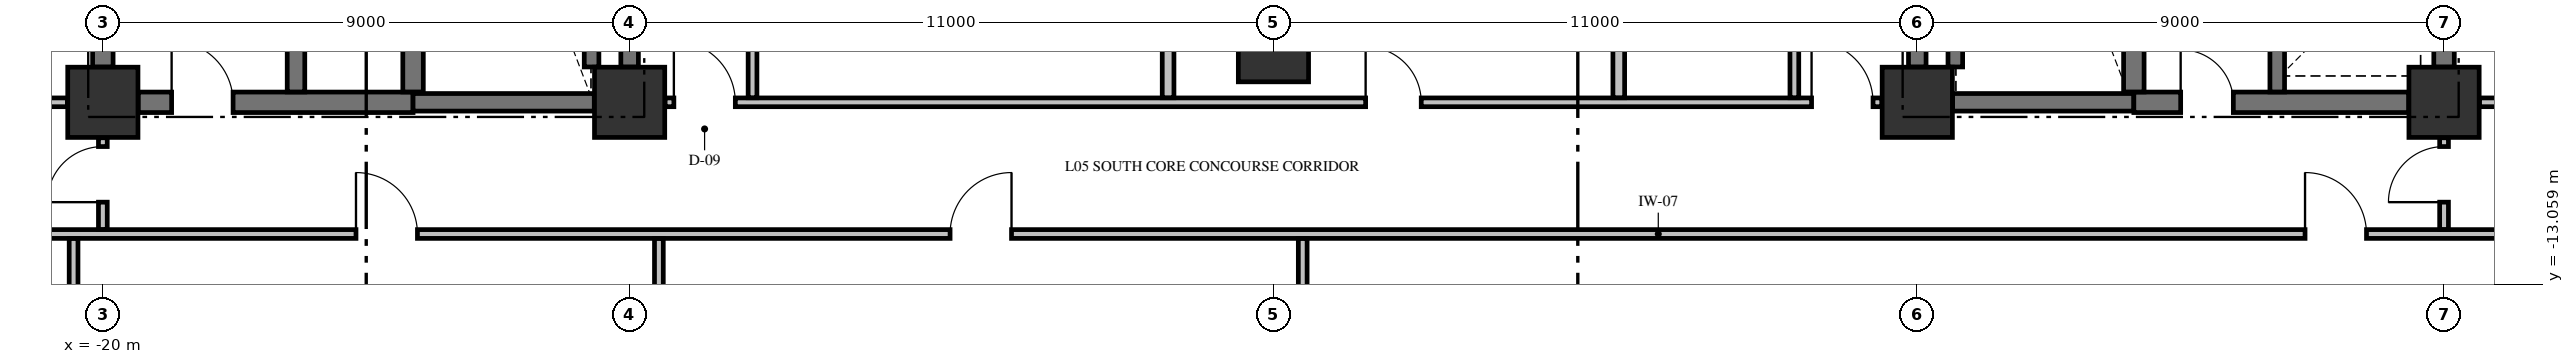
"""IFC4 building model, lengths in metres.
Left out: names, types, materials, properties, quantities, classifications, styles, units other than length and angle.
Written with IfcOpenShell. Run it as: python <this file> out.ifc"""

import sys

from ifc_helpers import new_model, si_unit, direction, frame, frame_2d, origin, origin_2d, place, context, subcontext, project, spatial, rectangle, extrude, element, fill, save


model = new_model("IFC4")
c1 = context("Model", 3, precision=1e-05, world=origin(), true_north=direction((0.0, 1.0)))
c2 = subcontext(c1, "Body", "Model", "MODEL_VIEW")
j1 = project(units=[si_unit("LENGTHUNIT", "METRE"), si_unit("PLANEANGLEUNIT", "RADIAN")], contexts=[c1])
p1 = place(None, origin())
s1 = spatial("IfcSite", under=j1, at=p1, CompositionType="ELEMENT")
p2 = place(p1, origin())
s2 = spatial("IfcBuilding", under=s1, at=p2, CompositionType="ELEMENT")
p3 = place(p2, frame((0.0, 0.0, 27.2)))
s3 = spatial("IfcBuildingStorey", under=s2, at=p3, CompositionType="ELEMENT", Elevation=27.2)
for number, where, z_axis, x_axis in (
    (1, (-20.0, -9.95, -0.45), (0.0, 0.0, 1.0), (1.0, 0.0, 0.0)),
    (2, (-11.0, -9.95, -0.45), (0.0, 0.0, 1.0), (1.0, 0.0, 0.0)),
    (3, (11.0, -9.95, -0.45), (0.0, 0.0, 1.0), (1.0, 0.0, 0.0)),
    (4, (20.0, -9.95, -0.45), (0.0, 0.0, 1.0), (1.0, 0.0, 0.0)),
    (5, (0.0, -9.0, -0.45), (0.0, 0.0, 1.0), (1.0, 0.0, 0.0)),
):
    element("IfcColumn", number, at=place(p3, frame(where, z_axis=z_axis, x_axis=x_axis)), inside=s3, PredefinedType="COLUMN", context=c2, shape_type="SweptSolid", body=[
        extrude(rectangle(XDim=1.2, YDim=1.2, at=origin_2d()), origin(), (0.0, 0.0, 1.0), 3.77),
    ])
p4 = place(p3, frame((-19.396, -9.95, 0.0), z_axis=(0.0, 0.0, 1.0), x_axis=(1.0, 0.0, 0.0)))
e6 = element("IfcWall", 6, at=p4, inside=s3, PredefinedType="SHEAR", context=c2, shape_type="SweptSolid", body=[
    extrude(rectangle(XDim=4.696, YDim=0.35, at=frame_2d((2.348, 0.0))), origin(), (0.0, 0.0, 1.0), 3.32),
])
p5 = place(p4, frame((0.571, 0.0, 0.0)))
e7 = element("IfcOpeningElement", 7, at=p5, cuts=e6, PredefinedType="OPENING", context=c2, shape_type="SweptSolid", body=[
    extrude(rectangle(XDim=1.05, YDim=2.15, at=frame_2d((0.525, 1.075))), frame((0.0, 0.185, 0.0), z_axis=(0.0, -1.0, 0.0), x_axis=(1.0, 0.0, 0.0)), (0.0, 0.0, 1.0), 0.37),
])
for number, where, z_axis, x_axis in (
    (8, (-14.7, -9.95, 0.0), (0.0, 0.0, 1.0), (1.0, 0.0, 0.0)),
    (9, (11.604, -9.95, 0.0), (0.0, 0.0, 1.0), (1.0, 0.0, 0.0)),
):
    element("IfcWall", number, at=place(p3, frame(where, z_axis=z_axis, x_axis=x_axis)), inside=s3, PredefinedType="SHEAR", context=c2, shape_type="SweptSolid", body=[
        extrude(rectangle(XDim=3.096, YDim=0.3, at=frame_2d((1.548, 0.0))), origin(), (0.0, 0.0, 1.0), 3.32),
    ])
p6 = place(p3, frame((14.7, -9.95, 0.0), z_axis=(0.0, 0.0, 1.0), x_axis=(1.0, 0.0, 0.0)))
e10 = element("IfcWall", 10, at=p6, inside=s3, PredefinedType="SHEAR", context=c2, shape_type="SweptSolid", body=[
    extrude(rectangle(XDim=4.696, YDim=0.35, at=frame_2d((2.348, 0.0))), origin(), (0.0, 0.0, 1.0), 3.32),
])
p7 = place(p6, frame((0.8, 0.0, 0.0)))
e11 = element("IfcOpeningElement", 11, at=p7, cuts=e10, PredefinedType="OPENING", context=c2, shape_type="SweptSolid", body=[
    extrude(rectangle(XDim=0.9, YDim=2.15, at=frame_2d((0.45, 1.075))), frame((0.0, 0.185, 0.0), z_axis=(0.0, -1.0, 0.0), x_axis=(1.0, 0.0, 0.0)), (0.0, 0.0, 1.0), 0.37),
])
p8 = place(p3, frame((-23.835, -12.2, 0.0), z_axis=(0.0, 0.0, 1.0), x_axis=(1.0, 0.0, 0.0)))
e12 = element("IfcWall", 12, at=p8, inside=s3, PredefinedType="PARTITIONING", context=c2, shape_type="SweptSolid", body=[
    extrude(rectangle(XDim=52.67, YDim=0.15, at=frame_2d((26.335, 0.0))), origin(), (0.0, 0.0, 1.0), 3.32),
])
p9 = place(p8, frame((8.16, 0.0, 0.0)))
e13 = element("IfcOpeningElement", 13, at=p9, cuts=e12, PredefinedType="OPENING", context=c2, shape_type="SweptSolid", body=[
    extrude(rectangle(XDim=1.05, YDim=2.15, at=frame_2d((0.525, 1.075))), frame((0.0, 0.085, 0.0), z_axis=(0.0, -1.0, 0.0), x_axis=(1.0, 0.0, 0.0)), (0.0, 0.0, 1.0), 0.17),
])
p10 = place(p8, frame((18.31, 0.0, 0.0)))
e14 = element("IfcOpeningElement", 14, at=p10, cuts=e12, PredefinedType="OPENING", context=c2, shape_type="SweptSolid", body=[
    extrude(rectangle(XDim=1.05, YDim=2.15, at=frame_2d((0.525, 1.075))), frame((0.0, 0.085, 0.0), z_axis=(0.0, -1.0, 0.0), x_axis=(1.0, 0.0, 0.0)), (0.0, 0.0, 1.0), 0.17),
])
p11 = place(p8, frame((41.46, 0.0, 0.0)))
e15 = element("IfcOpeningElement", 15, at=p11, cuts=e12, PredefinedType="OPENING", context=c2, shape_type="SweptSolid", body=[
    extrude(rectangle(XDim=1.05, YDim=2.15, at=frame_2d((0.525, 1.075))), frame((0.0, 0.085, 0.0), z_axis=(0.0, -1.0, 0.0), x_axis=(1.0, 0.0, 0.0)), (0.0, 0.0, 1.0), 0.17),
])
p12 = place(p3, frame((-23.835, -9.95, 0.0), z_axis=(0.0, 0.0, 1.0), x_axis=(1.0, 0.0, 0.0)))
e16 = element("IfcWall", 16, at=p12, inside=s3, PredefinedType="PARTITIONING", context=c2, shape_type="SweptSolid", body=[
    extrude(rectangle(XDim=3.229, YDim=0.15, at=frame_2d((1.615, 0.0))), origin(), (0.0, 0.0, 1.0), 3.32),
])
p13 = place(p12, frame((1.36, 0.0, 0.0)))
e17 = element("IfcOpeningElement", 17, at=p13, cuts=e16, PredefinedType="OPENING", context=c2, shape_type="SweptSolid", body=[
    extrude(rectangle(XDim=0.95, YDim=2.15, at=frame_2d((0.475, 1.075))), frame((0.0, 0.085, 0.0), z_axis=(0.0, -1.0, 0.0), x_axis=(1.0, 0.0, 0.0)), (0.0, 0.0, 1.0), 0.17),
])
p14 = place(p3, frame((-10.394, -9.95, 0.0), z_axis=(0.0, 0.0, 1.0), x_axis=(1.0, 0.0, 0.0)))
e18 = element("IfcWall", 18, at=p14, inside=s3, PredefinedType="PARTITIONING", context=c2, shape_type="SweptSolid", body=[
    extrude(rectangle(XDim=20.788, YDim=0.15, at=frame_2d((10.394, 0.0))), origin(), (0.0, 0.0, 1.0), 3.32),
])
p15 = place(p14, frame((0.15, 0.0, 0.0)))
e19 = element("IfcOpeningElement", 19, at=p15, cuts=e18, PredefinedType="OPENING", context=c2, shape_type="SweptSolid", body=[
    extrude(rectangle(XDim=1.05, YDim=2.15, at=frame_2d((0.525, 1.075))), frame((0.0, 0.085, 0.0), z_axis=(0.0, -1.0, 0.0), x_axis=(1.0, 0.0, 0.0)), (0.0, 0.0, 1.0), 0.17),
])
p16 = place(p14, frame((19.588, 0.0, 0.0)))
e20 = element("IfcOpeningElement", 20, at=p16, cuts=e18, PredefinedType="OPENING", context=c2, shape_type="SweptSolid", body=[
    extrude(rectangle(XDim=1.05, YDim=2.15, at=frame_2d((0.525, 1.075))), frame((0.0, 0.085, 0.0), z_axis=(0.0, -1.0, 0.0), x_axis=(1.0, 0.0, 0.0)), (0.0, 0.0, 1.0), 0.17),
])
p17 = place(p14, frame((11.969, 0.0, 0.0)))
e21 = element("IfcOpeningElement", 21, at=p17, cuts=e18, PredefinedType="OPENING", context=c2, shape_type="SweptSolid", body=[
    extrude(rectangle(XDim=0.95, YDim=2.15, at=frame_2d((0.475, 1.075))), frame((0.0, 0.085, 0.0), z_axis=(0.0, -1.0, 0.0), x_axis=(1.0, 0.0, 0.0)), (0.0, 0.0, 1.0), 0.17),
])
p18 = place(p3, frame((20.606, -9.95, 0.0), z_axis=(0.0, 0.0, 1.0), x_axis=(1.0, 0.0, 0.0)))
e22 = element("IfcWall", 22, at=p18, inside=s3, PredefinedType="PARTITIONING", context=c2, shape_type="SweptSolid", body=[
    extrude(rectangle(XDim=8.229, YDim=0.15, at=frame_2d((4.115, 0.0))), origin(), (0.0, 0.0, 1.0), 3.32),
])
p19 = place(p18, frame((3.394, 0.0, 0.0)))
e23 = element("IfcOpeningElement", 23, at=p19, cuts=e22, PredefinedType="OPENING", context=c2, shape_type="SweptSolid", body=[
    extrude(rectangle(XDim=1.0, YDim=2.15, at=frame_2d((0.5, 1.075))), frame((0.0, 0.085, 0.0), z_axis=(0.0, -1.0, 0.0), x_axis=(1.0, 0.0, 0.0)), (0.0, 0.0, 1.0), 0.17),
])
p20 = place(p3, frame((-20.0, -9.346, 0.0), z_axis=(0.0, 0.0, 1.0), x_axis=(0.0, 1.0, 0.0)))
e24 = element("IfcWall", 24, at=p20, inside=s3, PredefinedType="SHEAR", context=c2, shape_type="SweptSolid", body=[
    extrude(rectangle(XDim=8.742, YDim=0.35, at=frame_2d((4.371, 0.0))), origin(), (0.0, 0.0, 1.0), 3.32),
])
p21 = place(p3, frame((-16.7, -9.773, 0.0), z_axis=(0.0, 0.0, 1.0), x_axis=(0.0, 1.0, 0.0)))
e25 = element("IfcWall", 25, at=p21, inside=s3, PredefinedType="SHEAR", context=c2, shape_type="SweptSolid", body=[
    extrude(rectangle(XDim=9.371, YDim=0.3, at=frame_2d((4.686, 0.0))), origin(), (0.0, 0.0, 1.0), 3.32),
])
p22 = place(p3, frame((-14.7, -9.773, 0.0), z_axis=(0.0, 0.0, 1.0), x_axis=(0.0, 1.0, 0.0)))
e26 = element("IfcWall", 26, at=p22, inside=s3, PredefinedType="SHEAR", context=c2, shape_type="SweptSolid", body=[
    extrude(rectangle(XDim=9.371, YDim=0.35, at=frame_2d((4.686, 0.0))), origin(), (0.0, 0.0, 1.0), 3.32),
])
p23 = place(p3, frame((-11.65, -9.346, 0.0), z_axis=(0.0, 0.0, 1.0), x_axis=(0.0, 1.0, 0.0)))
e27 = element("IfcWall", 27, at=p23, inside=s3, PredefinedType="SOLIDWALL", context=c2, shape_type="SweptSolid", body=[
    extrude(rectangle(XDim=8.742, YDim=0.25, at=frame_2d((4.371, 0.0))), origin(), (0.0, 0.0, 1.0), 3.32),
])
for number, where, z_axis, x_axis in (
    (28, (-11.0, -9.346, 0.0), (0.0, 0.0, 1.0), (0.0, 1.0, 0.0)),
    (29, (11.0, -9.346, 0.0), (0.0, 0.0, 1.0), (0.0, 1.0, 0.0)),
):
    element("IfcWall", number, at=place(p3, frame(where, z_axis=z_axis, x_axis=x_axis)), inside=s3, PredefinedType="SHEAR", context=c2, shape_type="SweptSolid", body=[
        extrude(rectangle(XDim=8.742, YDim=0.3, at=frame_2d((4.371, 0.0))), origin(), (0.0, 0.0, 1.0), 3.32),
    ])
p24 = place(p3, frame((11.65, -9.346, 0.0), z_axis=(0.0, 0.0, 1.0), x_axis=(0.0, 1.0, 0.0)))
e30 = element("IfcWall", 30, at=p24, inside=s3, PredefinedType="SOLIDWALL", context=c2, shape_type="SweptSolid", body=[
    extrude(rectangle(XDim=8.742, YDim=0.25, at=frame_2d((4.371, 0.0))), origin(), (0.0, 0.0, 1.0), 3.32),
])
p25 = place(p3, frame((14.7, -9.773, 0.0), z_axis=(0.0, 0.0, 1.0), x_axis=(0.0, 1.0, 0.0)))
e31 = element("IfcWall", 31, at=p25, inside=s3, PredefinedType="SHEAR", context=c2, shape_type="SweptSolid", body=[
    extrude(rectangle(XDim=9.371, YDim=0.35, at=frame_2d((4.686, 0.0))), origin(), (0.0, 0.0, 1.0), 3.32),
])
p26 = place(p3, frame((17.15, -9.773, 0.0), z_axis=(0.0, 0.0, 1.0), x_axis=(0.0, 1.0, 0.0)))
e32 = element("IfcWall", 32, at=p26, inside=s3, PredefinedType="SOLIDWALL", context=c2, shape_type="SweptSolid", body=[
    extrude(rectangle(XDim=2.596, YDim=0.25, at=frame_2d((1.298, 0.0))), origin(), (0.0, 0.0, 1.0), 3.32),
])
p27 = place(p3, frame((20.0, -9.346, 0.0), z_axis=(0.0, 0.0, 1.0), x_axis=(0.0, 1.0, 0.0)))
e33 = element("IfcWall", 33, at=p27, inside=s3, PredefinedType="SHEAR", context=c2, shape_type="SweptSolid", body=[
    extrude(rectangle(XDim=2.169, YDim=0.35, at=frame_2d((1.084, 0.0))), origin(), (0.0, 0.0, 1.0), 3.32),
])
p28 = place(p3, frame((-20.5, -22.294, 0.0), z_axis=(0.0, 0.0, 1.0), x_axis=(0.0, 1.0, 0.0)))
e34 = element("IfcWall", 34, at=p28, inside=s3, PredefinedType="PARTITIONING", context=c2, shape_type="SweptSolid", body=[
    extrude(rectangle(XDim=10.016, YDim=0.15, at=frame_2d((5.008, 0.0))), origin(), (0.0, 0.0, 1.0), 3.32),
])
p29 = place(p3, frame((-20.0, -12.122, 0.0), z_axis=(0.0, 0.0, 1.0), x_axis=(0.0, 1.0, 0.0)))
e35 = element("IfcWall", 35, at=p29, inside=s3, PredefinedType="PARTITIONING", context=c2, shape_type="SweptSolid", body=[
    extrude(rectangle(XDim=1.566, YDim=0.15, at=frame_2d((0.783, 0.0))), origin(), (0.0, 0.0, 1.0), 3.32),
])
p30 = place(p29, frame((0.466, 0.0, 0.0)))
e36 = element("IfcOpeningElement", 36, at=p30, cuts=e35, PredefinedType="OPENING", context=c2, shape_type="SweptSolid", body=[
    extrude(rectangle(XDim=0.95, YDim=2.15, at=frame_2d((0.475, 1.075))), frame((0.0, 0.085, 0.0), z_axis=(0.0, -1.0, 0.0), x_axis=(1.0, 0.0, 0.0)), (0.0, 0.0, 1.0), 0.17),
])
p31 = place(p3, frame((-10.5, -25.794, 0.0), z_axis=(0.0, 0.0, 1.0), x_axis=(0.0, 1.0, 0.0)))
e37 = element("IfcWall", 37, at=p31, inside=s3, PredefinedType="PARTITIONING", context=c2, shape_type="SweptSolid", body=[
    extrude(rectangle(XDim=13.516, YDim=0.15, at=frame_2d((6.758, 0.0))), origin(), (0.0, 0.0, 1.0), 3.32),
])
p32 = place(p3, frame((-8.9, -9.872, 0.0), z_axis=(0.0, 0.0, 1.0), x_axis=(0.0, 1.0, 0.0)))
e38 = element("IfcWall", 38, at=p32, inside=s3, PredefinedType="PARTITIONING", context=c2, shape_type="SweptSolid", body=[
    extrude(rectangle(XDim=6.569, YDim=0.15, at=frame_2d((3.285, 0.0))), origin(), (0.0, 0.0, 1.0), 3.32),
])
p33 = place(p32, frame((2.827, 0.0, 0.0)))
e39 = element("IfcOpeningElement", 39, at=p33, cuts=e38, PredefinedType="OPENING", context=c2, shape_type="SweptSolid", body=[
    extrude(rectangle(XDim=0.95, YDim=2.15, at=frame_2d((0.475, 1.075))), frame((0.0, 0.085, 0.0), z_axis=(0.0, -1.0, 0.0), x_axis=(1.0, 0.0, 0.0)), (0.0, 0.0, 1.0), 0.17),
])
p34 = place(p3, frame((-1.8, -9.872, 0.0), z_axis=(0.0, 0.0, 1.0), x_axis=(0.0, 1.0, 0.0)))
e40 = element("IfcWall", 40, at=p34, inside=s3, PredefinedType="PARTITIONING", context=c2, shape_type="SweptSolid", body=[
    extrude(rectangle(XDim=4.969, YDim=0.2, at=frame_2d((2.484, 0.0))), origin(), (0.0, 0.0, 1.0), 3.32),
])
p35 = place(p3, frame((0.5, -25.794, 0.0), z_axis=(0.0, 0.0, 1.0), x_axis=(0.0, 1.0, 0.0)))
e41 = element("IfcWall", 41, at=p35, inside=s3, PredefinedType="PARTITIONING", context=c2, shape_type="SweptSolid", body=[
    extrude(rectangle(XDim=13.516, YDim=0.15, at=frame_2d((6.758, 0.0))), origin(), (0.0, 0.0, 1.0), 3.32),
])
p36 = place(p3, frame((5.9, -9.872, 0.0), z_axis=(0.0, 0.0, 1.0), x_axis=(0.0, 1.0, 0.0)))
e42 = element("IfcWall", 42, at=p36, inside=s3, PredefinedType="PARTITIONING", context=c2, shape_type="SweptSolid", body=[
    extrude(rectangle(XDim=4.969, YDim=0.2, at=frame_2d((2.484, 0.0))), origin(), (0.0, 0.0, 1.0), 3.32),
])
p37 = place(p3, frame((8.9, -9.872, 0.0), z_axis=(0.0, 0.0, 1.0), x_axis=(0.0, 1.0, 0.0)))
e43 = element("IfcWall", 43, at=p37, inside=s3, PredefinedType="PARTITIONING", context=c2, shape_type="SweptSolid", body=[
    extrude(rectangle(XDim=4.969, YDim=0.15, at=frame_2d((2.484, 0.0))), origin(), (0.0, 0.0, 1.0), 3.32),
])
p38 = place(p37, frame((1.997, 0.0, 0.0)))
e44 = element("IfcOpeningElement", 44, at=p38, cuts=e43, PredefinedType="OPENING", context=c2, shape_type="SweptSolid", body=[
    extrude(rectangle(XDim=0.95, YDim=2.15, at=frame_2d((0.475, 1.075))), frame((0.0, 0.085, 0.0), z_axis=(0.0, -1.0, 0.0), x_axis=(1.0, 0.0, 0.0)), (0.0, 0.0, 1.0), 0.17),
])
p39 = place(p3, frame((20.0, -12.122, 0.0), z_axis=(0.0, 0.0, 1.0), x_axis=(0.0, 1.0, 0.0)))
e45 = element("IfcWall", 45, at=p39, inside=s3, PredefinedType="PARTITIONING", context=c2, shape_type="SweptSolid", body=[
    extrude(rectangle(XDim=1.566, YDim=0.15, at=frame_2d((0.783, 0.0))), origin(), (0.0, 0.0, 1.0), 2.66),
])
p40 = place(p39, frame((0.466, 0.0, 0.0)))
e46 = element("IfcOpeningElement", 46, at=p40, cuts=e45, PredefinedType="OPENING", context=c2, shape_type="SweptSolid", body=[
    extrude(rectangle(XDim=0.95, YDim=2.15, at=frame_2d((0.475, 1.075))), frame((0.0, 0.085, 0.0), z_axis=(0.0, -1.0, 0.0), x_axis=(1.0, 0.0, 0.0)), (0.0, 0.0, 1.0), 0.17),
])
p41 = place(p5, origin())
e47 = element("IfcDoor", 47, at=p41, inside=s3, OperationType="SINGLE_SWING_LEFT", PredefinedType="DOOR", context=c2, shape_type="SweptSolid", body=[
    extrude(rectangle(XDim=1.05, YDim=2.15, at=frame_2d((0.525, 1.075))), frame((0.0, 0.025, 0.0), z_axis=(0.0, -1.0, 0.0), x_axis=(1.0, 0.0, 0.0)), (0.0, 0.0, 1.0), 0.05),
])
fill(e7, e47)
p42 = place(p7, origin())
e48 = element("IfcDoor", 48, at=p42, inside=s3, OperationType="SINGLE_SWING_LEFT", PredefinedType="DOOR", context=c2, shape_type="SweptSolid", body=[
    extrude(rectangle(XDim=0.9, YDim=2.15, at=frame_2d((0.45, 1.075))), frame((0.0, 0.025, 0.0), z_axis=(0.0, -1.0, 0.0), x_axis=(1.0, 0.0, 0.0)), (0.0, 0.0, 1.0), 0.05),
])
fill(e11, e48)
p43 = place(p15, origin())
e49 = element("IfcDoor", 49, at=p43, inside=s3, OperationType="SINGLE_SWING_LEFT", PredefinedType="DOOR", context=c2, shape_type="SweptSolid", body=[
    extrude(rectangle(XDim=1.05, YDim=2.15, at=frame_2d((0.525, 1.075))), frame((0.0, 0.025, 0.0), z_axis=(0.0, -1.0, 0.0), x_axis=(1.0, 0.0, 0.0)), (0.0, 0.0, 1.0), 0.05),
])
fill(e19, e49)
p44 = place(p16, origin())
e50 = element("IfcDoor", 50, at=p44, inside=s3, OperationType="SINGLE_SWING_LEFT", PredefinedType="DOOR", context=c2, shape_type="SweptSolid", body=[
    extrude(rectangle(XDim=1.05, YDim=2.15, at=frame_2d((0.525, 1.075))), frame((0.0, 0.025, 0.0), z_axis=(0.0, -1.0, 0.0), x_axis=(1.0, 0.0, 0.0)), (0.0, 0.0, 1.0), 0.05),
])
fill(e20, e50)
p45 = place(p9, origin())
e51 = element("IfcDoor", 51, at=p45, inside=s3, OperationType="SINGLE_SWING_LEFT", PredefinedType="DOOR", context=c2, shape_type="SweptSolid", body=[
    extrude(rectangle(XDim=1.05, YDim=2.15, at=frame_2d((0.525, 1.075))), frame((0.0, 0.025, 0.0), z_axis=(0.0, -1.0, 0.0), x_axis=(1.0, 0.0, 0.0)), (0.0, 0.0, 1.0), 0.05),
])
fill(e13, e51)
p46 = place(p10, origin())
e52 = element("IfcDoor", 52, at=p46, inside=s3, OperationType="SINGLE_SWING_RIGHT", PredefinedType="DOOR", context=c2, shape_type="SweptSolid", body=[
    extrude(rectangle(XDim=1.05, YDim=2.15, at=frame_2d((0.525, 1.075))), frame((0.0, 0.025, 0.0), z_axis=(0.0, -1.0, 0.0), x_axis=(1.0, 0.0, 0.0)), (0.0, 0.0, 1.0), 0.05),
])
fill(e14, e52)
p47 = place(p11, origin())
e53 = element("IfcDoor", 53, at=p47, inside=s3, OperationType="SINGLE_SWING_LEFT", PredefinedType="DOOR", context=c2, shape_type="SweptSolid", body=[
    extrude(rectangle(XDim=1.05, YDim=2.15, at=frame_2d((0.525, 1.075))), frame((0.0, 0.025, 0.0), z_axis=(0.0, -1.0, 0.0), x_axis=(1.0, 0.0, 0.0)), (0.0, 0.0, 1.0), 0.05),
])
fill(e15, e53)
p48 = place(p17, origin())
e54 = element("IfcDoor", 54, at=p48, inside=s3, OperationType="SINGLE_SWING_LEFT", PredefinedType="DOOR", context=c2, shape_type="SweptSolid", body=[
    extrude(rectangle(XDim=0.95, YDim=2.15, at=frame_2d((0.475, 1.075))), frame((0.0, 0.025, 0.0), z_axis=(0.0, -1.0, 0.0), x_axis=(1.0, 0.0, 0.0)), (0.0, 0.0, 1.0), 0.05),
])
fill(e21, e54)
p49 = place(p30, origin())
e55 = element("IfcDoor", 55, at=p49, inside=s3, OperationType="SINGLE_SWING_LEFT", PredefinedType="DOOR", context=c2, shape_type="SweptSolid", body=[
    extrude(rectangle(XDim=0.95, YDim=2.15, at=frame_2d((0.475, 1.075))), frame((0.0, 0.025, 0.0), z_axis=(0.0, -1.0, 0.0), x_axis=(1.0, 0.0, 0.0)), (0.0, 0.0, 1.0), 0.05),
])
fill(e36, e55)
p50 = place(p40, origin())
e56 = element("IfcDoor", 56, at=p50, inside=s3, OperationType="SINGLE_SWING_LEFT", PredefinedType="DOOR", context=c2, shape_type="SweptSolid", body=[
    extrude(rectangle(XDim=0.95, YDim=2.15, at=frame_2d((0.475, 1.075))), frame((0.0, 0.025, 0.0), z_axis=(0.0, -1.0, 0.0), x_axis=(1.0, 0.0, 0.0)), (0.0, 0.0, 1.0), 0.05),
])
fill(e46, e56)
save(model, sys.argv[1])
